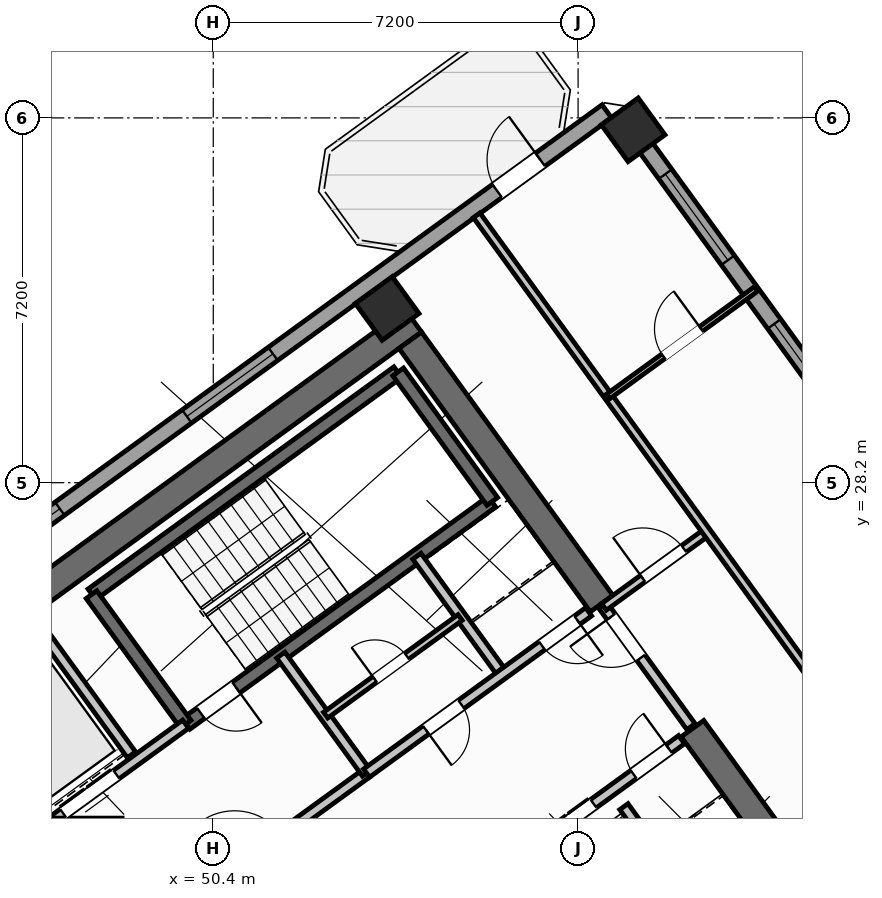
"""IFC4 building model, lengths in metres.
Left out: names, types, materials, properties, quantities, classifications, styles, units other than length and angle.
Written with IfcOpenShell. Run it as: python <this file> out.ifc"""

import sys

from ifc_helpers import new_model, si_unit, direction, frame, frame_2d, origin, origin_2d, place, context, subcontext, project, spatial, rectangle, hollow_rectangle, extrude, source, transform, mapped, element, fill, save


model = new_model("IFC4")
c1 = context("Model", 3, precision=1e-05, world=origin(), true_north=direction((0.0, 1.0)))
c2 = subcontext(c1, "Body", "Model", "MODEL_VIEW")
j1 = project(units=[si_unit("LENGTHUNIT", "METRE"), si_unit("PLANEANGLEUNIT", "RADIAN")], contexts=[c1])
p1 = place(None, origin())
s1 = spatial("IfcSite", under=j1, at=p1, CompositionType="ELEMENT")
p2 = place(p1, origin())
s2 = spatial("IfcBuilding", under=s1, at=p2, CompositionType="ELEMENT")
p3 = place(p2, frame((0.0, 0.0, 165.9)))
s3 = spatial("IfcBuildingStorey", under=s2, at=p3, CompositionType="ELEMENT", Elevation=165.9)
p4 = place(p3, frame((44.365, 24.142, 0.0), z_axis=(0.0, 0.0, 1.0), x_axis=(0.809024304885, 0.587775190107, 0.0)))
e1 = element("IfcWall", 1, at=p4, inside=s3, PredefinedType="SHEAR", context=c2, shape_type="SweptSolid", body=[
    extrude(rectangle(XDim=12.34, YDim=0.55, at=frame_2d((6.17, 0.0))), origin(), (0.0, 0.0, 1.0), 3.32),
])
p5 = place(p3, frame((48.526, 18.884, 0.0), z_axis=(0.0, 0.0, 1.0), x_axis=(-0.587764933797, 0.809031756236, 0.0)))
e2 = element("IfcWall", 2, at=p5, inside=s3, PredefinedType="SHEAR", context=c2, shape_type="SweptSolid", body=[
    extrude(rectangle(XDim=6.425, YDim=0.55, at=frame_2d((3.212, 0.0))), origin(), (0.0, 0.0, 1.0), 3.32),
])
p6 = place(p3, frame((61.958, 20.454, 0.0), z_axis=(0.0, 0.0, 1.0), x_axis=(-0.587802113096, 0.809004744015, 0.0)))
e3 = element("IfcWall", 3, at=p6, inside=s3, PredefinedType="SHEAR", context=c2, shape_type="SweptSolid", body=[
    extrude(rectangle(XDim=3.575, YDim=0.55, at=frame_2d((1.788, 0.0))), origin(), (0.0, 0.0, 1.0), 3.32),
])
p7 = place(p3, frame((58.064, 25.813, 0.0), z_axis=(0.0, 0.0, 1.0), x_axis=(-0.587764933797, 0.809031756236, 0.0)))
e4 = element("IfcWall", 4, at=p7, inside=s3, PredefinedType="SHEAR", context=c2, shape_type="SweptSolid", body=[
    extrude(rectangle(XDim=6.425, YDim=0.55, at=frame_2d((3.212, 0.0))), origin(), (0.0, 0.0, 1.0), 3.32),
])
m1 = source(origin(), c2, "Body", "SweptSolid", [
    extrude(hollow_rectangle(XDim=0.9, YDim=0.9, WallThickness=0.036, at=origin_2d()), origin(), (0.0, 0.0, 1.0), 3.6),
])
for number, where, z_axis, x_axis in (
    (5, (53.832, 31.638, 0.0), (0.0, 0.0, 1.0), (0.809, 0.588, 0.0)),
    (6, (58.686, 35.165, 0.0), (0.0, 0.0, 1.0), (0.809, 0.588, 0.0)),
):
    element("IfcColumn", number, at=place(p3, frame(where, z_axis=z_axis, x_axis=x_axis)), inside=s3, PredefinedType="COLUMN", context=c2, shape_type="MappedRepresentation", body=[
        mapped(m1, transform((0.0, 0.0, 0.0), scale=1.0)),
    ])
p8 = place(p3, frame((43.938, 25.192, 0.0), z_axis=(0.0, 0.0, 1.0), x_axis=(0.809016324578, 0.587786174187, 0.0)))
e7 = element("IfcWall", 7, at=p8, inside=s3, PredefinedType="STANDARD", context=c2, shape_type="SweptSolid", body=[
    extrude(rectangle(XDim=17.587, YDim=0.32, at=frame_2d((8.794, 0.0))), origin(), (0.0, 0.0, 1.0), 3.32),
])
p9 = place(p8, frame((14.914, 0.0, 0.0)))
e8 = element("IfcOpeningElement", 8, at=p9, cuts=e7, PredefinedType="OPENING", context=c2, shape_type="SweptSolid", body=[
    extrude(rectangle(XDim=1.05, YDim=2.15, at=frame_2d((0.525, 1.075))), frame((0.0, 0.17, 0.0), z_axis=(0.0, -1.0, 0.0), x_axis=(1.0, 0.0, 0.0)), (0.0, 0.0, 1.0), 0.34),
])
p10 = place(p8, frame((2.144, 0.0, 0.8)))
e9 = element("IfcOpeningElement", 9, at=p10, cuts=e7, PredefinedType="OPENING", context=c2, shape_type="SweptSolid", body=[
    extrude(rectangle(XDim=2.1, YDim=1.55, at=frame_2d((1.05, 0.775))), frame((0.0, 0.17, 0.0), z_axis=(0.0, -1.0, 0.0), x_axis=(1.0, 0.0, 0.0)), (0.0, 0.0, 1.0), 0.34),
])
p11 = place(p8, frame((7.344, 0.0, 0.8)))
e10 = element("IfcOpeningElement", 10, at=p11, cuts=e7, PredefinedType="OPENING", context=c2, shape_type="SweptSolid", body=[
    extrude(rectangle(XDim=2.1, YDim=1.55, at=frame_2d((1.05, 0.775))), frame((0.0, 0.17, 0.0), z_axis=(0.0, -1.0, 0.0), x_axis=(1.0, 0.0, 0.0)), (0.0, 0.0, 1.0), 0.34),
])
p12 = place(p3, frame((58.455, 35.484, 0.0), z_axis=(0.0, 0.0, 1.0), x_axis=(0.587783625747, -0.809018176127, 0.0)))
e11 = element("IfcWall", 11, at=p12, inside=s3, PredefinedType="STANDARD", context=c2, shape_type="SweptSolid", body=[
    extrude(rectangle(XDim=21.587, YDim=0.32, at=frame_2d((10.794, 0.0))), origin(), (0.0, 0.0, 1.0), 2.795),
])
p13 = place(p12, frame((1.475, 0.0, 0.8)))
e12 = element("IfcOpeningElement", 12, at=p13, cuts=e11, PredefinedType="OPENING", context=c2, shape_type="SweptSolid", body=[
    extrude(rectangle(XDim=2.1, YDim=1.55, at=frame_2d((1.05, 0.775))), frame((0.0, 0.17, 0.0), z_axis=(0.0, -1.0, 0.0), x_axis=(1.0, 0.0, 0.0)), (0.0, 0.0, 1.0), 0.34),
])
p14 = place(p12, frame((5.13, 0.0, 0.85)))
e13 = element("IfcOpeningElement", 13, at=p14, cuts=e11, PredefinedType="OPENING", context=c2, shape_type="SweptSolid", body=[
    extrude(rectangle(XDim=1.5, YDim=1.5, at=frame_2d((0.75, 0.75))), frame((0.0, 0.17, 0.0), z_axis=(0.0, -1.0, 0.0), x_axis=(1.0, 0.0, 0.0)), (0.0, 0.0, 1.0), 0.34),
])
p15 = place(p12, frame((8.929, 0.0, 0.85)))
e14 = element("IfcOpeningElement", 14, at=p15, cuts=e11, PredefinedType="OPENING", context=c2, shape_type="SweptSolid", body=[
    extrude(rectangle(XDim=1.5, YDim=1.5, at=frame_2d((0.75, 0.75))), frame((0.0, 0.17, 0.0), z_axis=(0.0, -1.0, 0.0), x_axis=(1.0, 0.0, 0.0)), (0.0, 0.0, 1.0), 0.34),
])
p16 = place(p12, frame((17.581, 0.0, 0.95)))
e15 = element("IfcOpeningElement", 15, at=p16, cuts=e11, PredefinedType="OPENING", context=c2, shape_type="SweptSolid", body=[
    extrude(rectangle(XDim=1.2, YDim=1.4, at=frame_2d((0.6, 0.7))), frame((0.0, 0.17, 0.0), z_axis=(0.0, -1.0, 0.0), x_axis=(1.0, 0.0, 0.0)), (0.0, 0.0, 1.0), 0.34),
])
p17 = place(p3, frame((48.006, 25.996, 0.0), z_axis=(0.0, 0.0, 1.0), x_axis=(0.80901903764, 0.587782439969, 0.0)))
e16 = element("IfcWall", 16, at=p17, inside=s3, PredefinedType="SHEAR", context=c2, shape_type="SweptSolid", body=[
    extrude(rectangle(XDim=7.46, YDim=0.26, at=frame_2d((3.73, 0.0))), origin(), (0.0, 0.0, 1.0), 3.32),
])
p18 = place(p3, frame((49.863, 23.44, 0.0), z_axis=(0.0, 0.0, 1.0), x_axis=(0.809003474932, 0.587803859759, 0.0)))
e17 = element("IfcWall", 17, at=p18, inside=s3, PredefinedType="SHEAR", context=c2, shape_type="SweptSolid", body=[
    extrude(rectangle(XDim=7.46, YDim=0.26, at=frame_2d((3.73, 0.0))), origin(), (0.0, 0.0, 1.0), 3.32),
])
p19 = place(p18, frame((0.36, 0.0, 0.0)))
e18 = element("IfcOpeningElement", 18, at=p19, cuts=e17, PredefinedType="OPENING", context=c2, shape_type="SweptSolid", body=[
    extrude(rectangle(XDim=0.86, YDim=2.05, at=frame_2d((0.43, 1.025))), frame((0.0, 0.14, 0.0), z_axis=(0.0, -1.0, 0.0), x_axis=(1.0, 0.0, 0.0)), (0.0, 0.0, 1.0), 0.28),
])
p20 = place(p3, frame((49.855, 23.434, 0.0), z_axis=(0.0, 0.0, 1.0), x_axis=(-0.58776738483, 0.809029975545, 0.0)))
e19 = element("IfcWall", 19, at=p20, inside=s3, PredefinedType="SHEAR", context=c2, shape_type="SweptSolid", body=[
    extrude(rectangle(XDim=3.16, YDim=0.26, at=frame_2d((1.58, 0.0))), origin(), (0.0, 0.0, 1.0), 3.32),
])
p21 = place(p3, frame((55.906, 27.831, 0.0), z_axis=(0.0, 0.0, 1.0), x_axis=(-0.587804123638, 0.809003283204, 0.0)))
e20 = element("IfcWall", 20, at=p21, inside=s3, PredefinedType="SHEAR", context=c2, shape_type="SweptSolid", body=[
    extrude(rectangle(XDim=3.16, YDim=0.26, at=frame_2d((1.58, 0.0))), origin(), (0.0, 0.0, 1.0), 3.32),
])
p22 = place(p3, frame((47.065, 21.407, 0.0), z_axis=(0.0, 0.0, 1.0), x_axis=(0.809032984992, 0.587763242466, 0.0)))
e21 = element("IfcWall", 21, at=p22, inside=s3, PredefinedType="STANDARD", context=c2, shape_type="SweptSolid", body=[
    extrude(rectangle(XDim=3.448, YDim=0.2, at=frame_2d((1.724, 0.0))), origin(), (0.0, 0.0, 1.0), 3.31),
])
p23 = place(p22, frame((0.458, 0.0, 0.0)))
e22 = element("IfcOpeningElement", 22, at=p23, cuts=e21, PredefinedType="OPENING", context=c2, shape_type="SweptSolid", body=[
    extrude(rectangle(XDim=1.3, YDim=2.2, at=frame_2d((0.65, 1.1))), frame((0.0, 0.11, 0.0), z_axis=(0.0, -1.0, 0.0), x_axis=(1.0, 0.0, 0.0)), (0.0, 0.0, 1.0), 0.22),
])
p24 = place(p3, frame((48.758, 19.077, 0.0), z_axis=(0.0, 0.0, 1.0), x_axis=(0.809005065155, 0.587801671104, 0.0)))
e23 = element("IfcWall", 23, at=p24, inside=s3, PredefinedType="STANDARD", context=c2, shape_type="SweptSolid", body=[
    extrude(rectangle(XDim=5.768, YDim=0.2, at=frame_2d((2.884, 0.0))), origin(), (0.0, 0.0, 1.0), 3.31),
])
p25 = place(p24, frame((2.548, 0.0, 0.0)))
e24 = element("IfcOpeningElement", 24, at=p25, cuts=e23, PredefinedType="OPENING", context=c2, shape_type="SweptSolid", body=[
    extrude(rectangle(XDim=1.15, YDim=2.1, at=frame_2d((0.575, 1.05))), frame((0.0, 0.11, 0.0), z_axis=(0.0, -1.0, 0.0), x_axis=(1.0, 0.0, 0.0)), (0.0, 0.0, 1.0), 0.22),
])
p26 = place(p3, frame((56.553, 20.884, 0.0), z_axis=(0.0, 0.0, 1.0), x_axis=(0.809023564264, 0.58777620951, 0.0)))
e25 = element("IfcWall", 25, at=p26, inside=s3, PredefinedType="STANDARD", context=c2, shape_type="SweptSolid", body=[
    extrude(rectangle(XDim=3.818, YDim=0.2, at=frame_2d((1.909, 0.0))), origin(), (0.0, 0.0, 1.0), 3.31),
])
p27 = place(p26, frame((0.57, 0.0, 0.0)))
e26 = element("IfcOpeningElement", 26, at=p27, cuts=e25, PredefinedType="OPENING", context=c2, shape_type="SweptSolid", body=[
    extrude(rectangle(XDim=1.1, YDim=2.15, at=frame_2d((0.55, 1.075))), frame((0.0, 0.11, 0.0), z_axis=(0.0, -1.0, 0.0), x_axis=(1.0, 0.0, 0.0)), (0.0, 0.0, 1.0), 0.22),
])
p28 = place(p26, frame((2.65, 0.0, 0.0)))
e27 = element("IfcOpeningElement", 27, at=p28, cuts=e25, PredefinedType="OPENING", context=c2, shape_type="SweptSolid", body=[
    extrude(rectangle(XDim=0.86, YDim=2.05, at=frame_2d((0.43, 1.025))), frame((0.0, 0.11, 0.0), z_axis=(0.0, -1.0, 0.0), x_axis=(1.0, 0.0, 0.0)), (0.0, 0.0, 1.0), 0.22),
])
p29 = place(p3, frame((48.786, 22.83, 0.0), z_axis=(0.0, 0.0, 1.0), x_axis=(-0.587783856777, 0.809018008275, 0.0)))
e28 = element("IfcWall", 28, at=p29, inside=s3, PredefinedType="STANDARD", context=c2, shape_type="SweptSolid", body=[
    extrude(rectangle(XDim=2.92, YDim=0.2, at=frame_2d((1.46, 0.0))), origin(), (0.0, 0.0, 1.0), 3.31),
])
p30 = place(p3, frame((60.067, 19.655, 0.0), z_axis=(0.0, 0.0, 1.0), x_axis=(-0.587800520745, 0.809005900975, 0.0)))
e29 = element("IfcWall", 29, at=p30, inside=s3, PredefinedType="STANDARD", context=c2, shape_type="SweptSolid", body=[
    extrude(rectangle(XDim=2.66, YDim=0.2, at=frame_2d((1.33, 0.0))), origin(), (0.0, 0.0, 1.0), 3.31),
])
p31 = place(p3, frame((53.425, 22.468, 0.0), z_axis=(0.0, 0.0, 1.0), x_axis=(-0.5877230039, 0.809062216821, 0.0)))
e30 = element("IfcWall", 30, at=p31, inside=s3, PredefinedType="STANDARD", context=c2, shape_type="SweptSolid", body=[
    extrude(rectangle(XDim=2.88, YDim=0.2, at=frame_2d((1.44, 0.0))), origin(), (0.0, 0.0, 1.0), 3.31),
])
p32 = place(p3, frame((56.111, 24.419, 0.0), z_axis=(0.0, 0.0, 1.0), x_axis=(-0.58777848983, 0.809021907548, 0.0)))
e31 = element("IfcWall", 31, at=p32, inside=s3, PredefinedType="STANDARD", context=c2, shape_type="SweptSolid", body=[
    extrude(rectangle(XDim=2.88, YDim=0.2, at=frame_2d((1.44, 0.0))), origin(), (0.0, 0.0, 1.0), 3.31),
])
p33 = place(p3, frame((53.425, 22.468, 0.0), z_axis=(0.0, 0.0, 1.0), x_axis=(0.809024377198, 0.587775090574, 0.0)))
e32 = element("IfcWall", 32, at=p33, inside=s3, PredefinedType="STANDARD", context=c2, shape_type="SweptSolid", body=[
    extrude(rectangle(XDim=5.418, YDim=0.2, at=frame_2d((2.709, 0.0))), origin(), (0.0, 0.0, 1.0), 3.31),
])
p34 = place(p33, frame((4.28, 0.0, 0.0)))
e33 = element("IfcOpeningElement", 33, at=p34, cuts=e32, PredefinedType="OPENING", context=c2, shape_type="SweptSolid", body=[
    extrude(rectangle(XDim=0.86, YDim=2.05, at=frame_2d((0.43, 1.025))), frame((0.0, 0.11, 0.0), z_axis=(0.0, -1.0, 0.0), x_axis=(1.0, 0.0, 0.0)), (0.0, 0.0, 1.0), 0.22),
])
p35 = place(p33, frame((1.45, 0.0, 0.0)))
e34 = element("IfcOpeningElement", 34, at=p35, cuts=e32, PredefinedType="OPENING", context=c2, shape_type="SweptSolid", body=[
    extrude(rectangle(XDim=0.86, YDim=2.05, at=frame_2d((0.43, 1.025))), frame((0.0, 0.11, 0.0), z_axis=(0.0, -1.0, 0.0), x_axis=(1.0, 0.0, 0.0)), (0.0, 0.0, 1.0), 0.22),
])
p36 = place(p3, frame((52.618, 23.612, 0.0), z_axis=(0.0, 0.0, 1.0), x_axis=(0.809009587469, 0.587795446889, 0.0)))
e35 = element("IfcWall", 35, at=p36, inside=s3, PredefinedType="PLUMBINGWALL", context=c2, shape_type="SweptSolid", body=[
    extrude(rectangle(XDim=3.28, YDim=0.14, at=frame_2d((1.64, 0.0))), origin(), (0.0, 0.0, 1.0), 3.31),
])
p37 = place(p36, frame((1.2, 0.0, 0.0)))
e36 = element("IfcOpeningElement", 36, at=p37, cuts=e35, PredefinedType="OPENING", context=c2, shape_type="SweptSolid", body=[
    extrude(rectangle(XDim=0.78, YDim=2.05, at=frame_2d((0.39, 1.025))), frame((0.0, 0.08, 0.0), z_axis=(0.0, -1.0, 0.0), x_axis=(1.0, 0.0, 0.0)), (0.0, 0.0, 1.0), 0.16),
])
p38 = place(p3, frame((59.827, 23.386, 0.0), z_axis=(0.0, 0.0, 1.0), x_axis=(-0.587803840107, 0.809003489211, 0.0)))
e37 = element("IfcWall", 37, at=p38, inside=s3, PredefinedType="STANDARD", context=c2, shape_type="SweptSolid", body=[
    extrude(rectangle(XDim=2.96, YDim=0.2, at=frame_2d((1.48, 0.0))), origin(), (0.0, 0.0, 1.0), 3.31),
])
p39 = place(p38, frame((1.68, 0.0, 0.0)))
e38 = element("IfcOpeningElement", 38, at=p39, cuts=e37, PredefinedType="OPENING", context=c2, shape_type="SweptSolid", body=[
    extrude(rectangle(XDim=1.0, YDim=2.1, at=frame_2d((0.5, 1.05))), frame((0.0, 0.11, 0.0), z_axis=(0.0, -1.0, 0.0), x_axis=(1.0, 0.0, 0.0)), (0.0, 0.0, 1.0), 0.22),
])
p40 = place(p3, frame((58.111, 25.749, 0.0), z_axis=(0.0, 0.0, 1.0), x_axis=(0.809000999347, 0.58780726693, 0.0)))
e39 = element("IfcWall", 39, at=p40, inside=s3, PredefinedType="PARTITIONING", context=c2, shape_type="SweptSolid", body=[
    extrude(rectangle(XDim=2.51, YDim=0.16, at=frame_2d((1.255, 0.0))), origin(), (0.0, 0.0, 1.0), 2.795),
])
p41 = place(p40, frame((0.95, 0.0, 0.0)))
e40 = element("IfcOpeningElement", 40, at=p41, cuts=e39, PredefinedType="OPENING", context=c2, shape_type="SweptSolid", body=[
    extrude(rectangle(XDim=1.0, YDim=2.1, at=frame_2d((0.5, 1.05))), frame((0.0, 0.09, 0.0), z_axis=(0.0, -1.0, 0.0), x_axis=(1.0, 0.0, 0.0)), (0.0, 0.0, 1.0), 0.18),
])
p42 = place(p3, frame((62.328, 24.215, 0.0), z_axis=(0.0, 0.0, 1.0), x_axis=(-0.587778600963, 0.809021826807, 0.0)))
e41 = element("IfcWall", 41, at=p42, inside=s3, PredefinedType="PARTITIONING", context=c2, shape_type="SweptSolid", body=[
    extrude(rectangle(XDim=11.45, YDim=0.16, at=frame_2d((5.725, 0.0))), origin(), (0.0, 0.0, 1.0), 3.31),
])
p43 = place(p3, frame((58.195, 29.904, 0.0), z_axis=(0.0, 0.0, 1.0), x_axis=(0.809005039917, 0.58780170584, 0.0)))
e42 = element("IfcWall", 42, at=p43, inside=s3, PredefinedType="PARTITIONING", context=c2, shape_type="SweptSolid", body=[
    extrude(rectangle(XDim=3.61, YDim=0.11, at=frame_2d((1.805, 0.0))), origin(), (0.0, 0.0, 1.0), 3.31),
])
p44 = place(p43, frame((1.345, 0.0, 0.0)))
e43 = element("IfcOpeningElement", 43, at=p44, cuts=e42, PredefinedType="OPENING", context=c2, shape_type="SweptSolid", body=[
    extrude(rectangle(XDim=0.92, YDim=2.08, at=frame_2d((0.46, 1.04))), frame((0.0, 0.065, 0.0), z_axis=(0.0, -1.0, 0.0), x_axis=(1.0, 0.0, 0.0)), (0.0, 0.0, 1.0), 0.13),
])
m2 = source(origin(), c2, "Body", "SweptSolid", [
    extrude(rectangle(XDim=1.05, YDim=2.15, at=frame_2d((0.525, 1.075))), frame((0.0, 0.025, 0.0), z_axis=(0.0, -1.0, 0.0), x_axis=(1.0, 0.0, 0.0)), (0.0, 0.0, 1.0), 0.05),
])
p45 = place(p9, origin())
e44 = element("IfcDoor", 44, at=p45, inside=s3, OperationType="SINGLE_SWING_RIGHT", PredefinedType="DOOR", context=c2, shape_type="MappedRepresentation", body=[
    mapped(m2, transform((0.0, 0.0, 0.0), scale=1.0)),
])
fill(e8, e44)
m3 = source(origin(), c2, "Body", "SweptSolid", [
    extrude(rectangle(XDim=2.1, YDim=1.55, at=frame_2d((1.05, 0.775))), frame((0.0, 0.03, 0.0), z_axis=(0.0, -1.0, 0.0), x_axis=(1.0, 0.0, 0.0)), (0.0, 0.0, 1.0), 0.06),
])
p46 = place(p10, origin())
e45 = element("IfcWindow", 45, at=p46, inside=s3, PartitioningType="SINGLE_PANEL", PredefinedType="WINDOW", context=c2, shape_type="MappedRepresentation", body=[
    mapped(m3, transform((0.0, 0.0, 0.0), scale=1.0)),
])
fill(e9, e45)
p47 = place(p11, origin())
e46 = element("IfcWindow", 46, at=p47, inside=s3, PartitioningType="SINGLE_PANEL", PredefinedType="WINDOW", context=c2, shape_type="MappedRepresentation", body=[
    mapped(m3, transform((0.0, 0.0, 0.0), scale=1.0)),
])
fill(e10, e46)
p48 = place(p13, origin())
e47 = element("IfcWindow", 47, at=p48, inside=s3, PartitioningType="SINGLE_PANEL", PredefinedType="WINDOW", context=c2, shape_type="MappedRepresentation", body=[
    mapped(m3, transform((0.0, 0.0, 0.0), scale=1.0)),
])
fill(e12, e47)
m4 = source(origin(), c2, "Body", "SweptSolid", [
    extrude(rectangle(XDim=1.5, YDim=1.5, at=frame_2d((0.75, 0.75))), frame((0.0, 0.03, 0.0), z_axis=(0.0, -1.0, 0.0), x_axis=(1.0, 0.0, 0.0)), (0.0, 0.0, 1.0), 0.06),
])
p49 = place(p14, origin())
e48 = element("IfcWindow", 48, at=p49, inside=s3, PartitioningType="SINGLE_PANEL", PredefinedType="WINDOW", context=c2, shape_type="MappedRepresentation", body=[
    mapped(m4, transform((0.0, 0.0, 0.0), scale=1.0)),
])
fill(e13, e48)
m5 = source(origin(), c2, "Body", "SweptSolid", [
    extrude(rectangle(XDim=0.86, YDim=2.05, at=frame_2d((0.43, 1.025))), frame((0.0, 0.025, 0.0), z_axis=(0.0, -1.0, 0.0), x_axis=(1.0, 0.0, 0.0)), (0.0, 0.0, 1.0), 0.05),
])
p50 = place(p19, frame((0.86, 0.0, 0.0), z_axis=(0.0, 0.0, 1.0), x_axis=(-1.0, 0.0, 0.0)))
e49 = element("IfcDoor", 49, at=p50, inside=s3, OperationType="SINGLE_SWING_LEFT", PredefinedType="DOOR", context=c2, shape_type="MappedRepresentation", body=[
    mapped(m5, transform((0.0, 0.0, 0.0), scale=1.0)),
])
fill(e18, e49)
m6 = source(origin(), c2, "Body", "SweptSolid", [
    extrude(rectangle(XDim=1.3, YDim=2.2, at=frame_2d((0.65, 1.1))), frame((0.0, 0.025, 0.0), z_axis=(0.0, -1.0, 0.0), x_axis=(1.0, 0.0, 0.0)), (0.0, 0.0, 1.0), 0.05),
])
p51 = place(p23, origin())
e50 = element("IfcDoor", 50, at=p51, inside=s3, OperationType="DOUBLE_DOOR_SLIDING", PredefinedType="DOOR", context=c2, shape_type="MappedRepresentation", body=[
    mapped(m6, transform((0.0, 0.0, 0.0), scale=1.0)),
])
fill(e22, e50)
m7 = source(origin(), c2, "Body", "SweptSolid", [
    extrude(rectangle(XDim=1.1, YDim=2.15, at=frame_2d((0.55, 1.075))), frame((0.0, 0.025, 0.0), z_axis=(0.0, -1.0, 0.0), x_axis=(1.0, 0.0, 0.0)), (0.0, 0.0, 1.0), 0.05),
])
p52 = place(p27, origin())
e51 = element("IfcDoor", 51, at=p52, inside=s3, OperationType="DOUBLE_DOOR_SLIDING", PredefinedType="DOOR", context=c2, shape_type="MappedRepresentation", body=[
    mapped(m7, transform((0.0, 0.0, 0.0), scale=1.0)),
])
fill(e26, e51)
p53 = place(p28, origin())
e52 = element("IfcDoor", 52, at=p53, inside=s3, OperationType="SINGLE_SWING_RIGHT", PredefinedType="DOOR", context=c2, shape_type="MappedRepresentation", body=[
    mapped(m5, transform((0.0, 0.0, 0.0), scale=1.0)),
])
fill(e27, e52)
p54 = place(p34, frame((0.86, 0.0, 0.0), z_axis=(0.0, 0.0, 1.0), x_axis=(-1.0, 0.0, 0.0)))
e53 = element("IfcDoor", 53, at=p54, inside=s3, OperationType="SINGLE_SWING_LEFT", PredefinedType="DOOR", context=c2, shape_type="MappedRepresentation", body=[
    mapped(m5, transform((0.0, 0.0, 0.0), scale=1.0)),
])
fill(e33, e53)
p55 = place(p35, frame((0.86, 0.0, 0.0), z_axis=(0.0, 0.0, 1.0), x_axis=(-1.0, 0.0, 0.0)))
e54 = element("IfcDoor", 54, at=p55, inside=s3, OperationType="SINGLE_SWING_RIGHT", PredefinedType="DOOR", context=c2, shape_type="MappedRepresentation", body=[
    mapped(m5, transform((0.0, 0.0, 0.0), scale=1.0)),
])
fill(e34, e54)
m8 = source(origin(), c2, "Body", "SweptSolid", [
    extrude(rectangle(XDim=0.78, YDim=2.05, at=frame_2d((0.39, 1.025))), frame((0.0, 0.025, 0.0), z_axis=(0.0, -1.0, 0.0), x_axis=(1.0, 0.0, 0.0)), (0.0, 0.0, 1.0), 0.05),
])
p56 = place(p37, origin())
e55 = element("IfcDoor", 55, at=p56, inside=s3, OperationType="SINGLE_SWING_LEFT", PredefinedType="DOOR", context=c2, shape_type="MappedRepresentation", body=[
    mapped(m8, transform((0.0, 0.0, 0.0), scale=1.0)),
])
fill(e36, e55)
m9 = source(origin(), c2, "Body", "SweptSolid", [
    extrude(rectangle(XDim=1.0, YDim=2.1, at=frame_2d((0.5, 1.05))), frame((0.0, 0.025, 0.0), z_axis=(0.0, -1.0, 0.0), x_axis=(1.0, 0.0, 0.0)), (0.0, 0.0, 1.0), 0.05),
])
p57 = place(p41, origin())
e56 = element("IfcDoor", 56, at=p57, inside=s3, OperationType="SINGLE_SWING_LEFT", PredefinedType="DOOR", context=c2, shape_type="MappedRepresentation", body=[
    mapped(m9, transform((0.0, 0.0, 0.0), scale=1.0)),
])
fill(e40, e56)
p58 = place(p39, origin())
e57 = element("IfcDoor", 57, at=p58, inside=s3, OperationType="SINGLE_SWING_RIGHT", PredefinedType="DOOR", context=c2, shape_type="MappedRepresentation", body=[
    mapped(m9, transform((0.0, 0.0, 0.0), scale=1.0)),
])
fill(e38, e57)
m10 = source(origin(), c2, "Body", "SweptSolid", [
    extrude(rectangle(XDim=0.92, YDim=2.08, at=frame_2d((0.46, 1.04))), frame((0.0, 0.025, 0.0), z_axis=(0.0, -1.0, 0.0), x_axis=(1.0, 0.0, 0.0)), (0.0, 0.0, 1.0), 0.05),
])
p59 = place(p44, origin())
e58 = element("IfcDoor", 58, at=p59, inside=s3, OperationType="SINGLE_SWING_RIGHT", PredefinedType="DOOR", context=c2, shape_type="MappedRepresentation", body=[
    mapped(m10, transform((0.0, 0.0, 0.0), scale=1.0)),
])
fill(e43, e58)
save(model, sys.argv[1])
